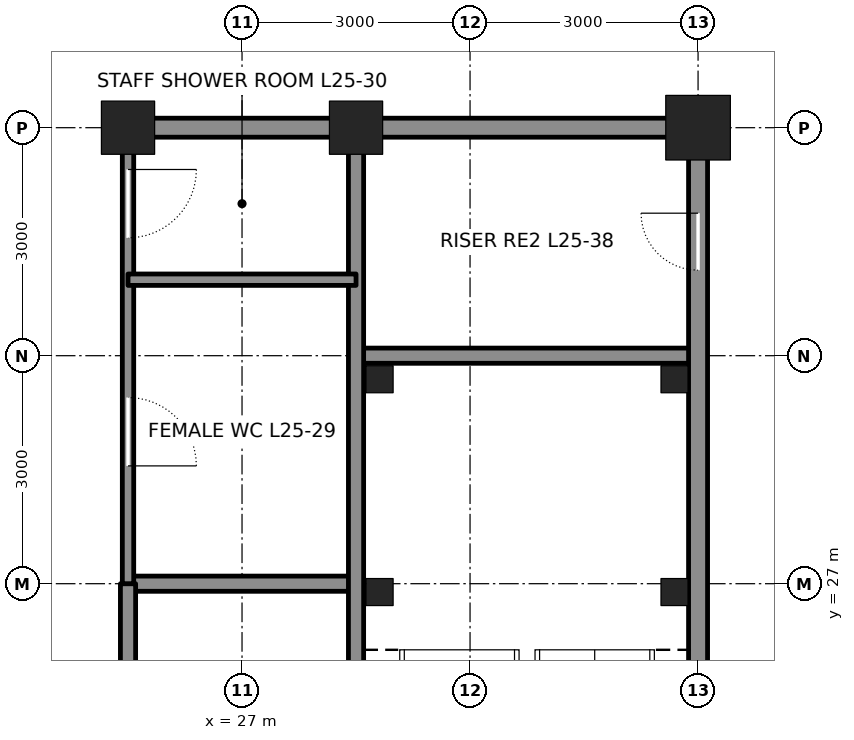
"""IFC4 building model, lengths in metres.
Left out: names, types, materials, properties, quantities, classifications, styles, units other than length and angle.
Written with IfcOpenShell. Run it as: python <this file> out.ifc"""

import sys

from ifc_helpers import new_model, si_unit, direction, frame, frame_2d, origin, origin_2d, place, context, subcontext, project, spatial, rectangle, hollow_rectangle, extrude, element, fill, save


model = new_model("IFC4")
c1 = context("Model", 3, precision=1e-05, world=origin(), true_north=direction((0.0, 1.0)))
c2 = subcontext(c1, "Body", "Model", "MODEL_VIEW")
j1 = project(units=[si_unit("LENGTHUNIT", "METRE"), si_unit("PLANEANGLEUNIT", "RADIAN")], contexts=[c1])
p1 = place(None, origin())
s1 = spatial("IfcSite", under=j1, at=p1, CompositionType="ELEMENT")
p2 = place(p1, origin())
s2 = spatial("IfcBuilding", under=s1, at=p2, CompositionType="ELEMENT")
p3 = place(p2, frame((0.0, 0.0, 119.4)))
s3 = spatial("IfcBuildingStorey", under=s2, at=p3, CompositionType="ELEMENT", Elevation=119.4)
for number, where, z_axis, x_axis in (
    (1, (25.5, 33.0, 0.0), (0.0, 0.0, 1.0), (1.0, 0.0, 0.0)),
    (2, (28.5, 33.0, 0.0), (0.0, 0.0, 1.0), (1.0, 0.0, 0.0)),
):
    element("IfcColumn", number, at=place(p3, frame(where, z_axis=z_axis, x_axis=x_axis)), inside=s3, PredefinedType="COLUMN", context=c2, shape_type="SweptSolid", body=[
        extrude(hollow_rectangle(XDim=0.7, YDim=0.7, WallThickness=0.07, at=origin_2d()), origin(), (0.0, 0.0, 1.0), 4.2),
    ])
p4 = place(p3, frame((33.0, 33.0, 0.0), z_axis=(0.0, 0.0, 1.0), x_axis=(1.0, 0.0, 0.0)))
e3 = element("IfcColumn", 3, at=p4, inside=s3, PredefinedType="COLUMN", context=c2, shape_type="SweptSolid", body=[
    extrude(hollow_rectangle(XDim=0.85, YDim=0.85, WallThickness=0.085, at=origin_2d()), origin(), (0.0, 0.0, 1.0), 4.2),
])
p5 = place(p3, frame((25.5, 27.0, 0.0), z_axis=(0.0, 0.0, 1.0), x_axis=(1.0, 0.0, 0.0)))
e4 = element("IfcWall", 4, at=p5, inside=s3, PredefinedType="SOLIDWALL", context=c2, shape_type="SweptSolid", body=[
    extrude(rectangle(XDim=3.0, YDim=0.2, at=frame_2d((1.5, 0.0))), origin(), (0.0, 0.0, 1.0), 4.04),
])
p6 = place(p3, frame((28.5, 30.0, 0.0), z_axis=(0.0, 0.0, 1.0), x_axis=(1.0, 0.0, 0.0)))
e5 = element("IfcWall", 5, at=p6, inside=s3, PredefinedType="SOLIDWALL", context=c2, shape_type="SweptSolid", body=[
    extrude(rectangle(XDim=4.5, YDim=0.2, at=frame_2d((2.25, 0.0))), origin(), (0.0, 0.0, 1.0), 4.04),
])
p7 = place(p3, frame((25.75, 33.0, 0.0), z_axis=(0.0, 0.0, 1.0), x_axis=(1.0, 0.0, 0.0)))
e6 = element("IfcWall", 6, at=p7, inside=s3, PredefinedType="SOLIDWALL", context=c2, shape_type="SweptSolid", body=[
    extrude(rectangle(XDim=2.5, YDim=0.25, at=frame_2d((1.25, 0.0))), origin(), (0.0, 0.0, 1.0), 3.182),
])
p8 = place(p3, frame((28.75, 33.0, 0.0), z_axis=(0.0, 0.0, 1.0), x_axis=(1.0, 0.0, 0.0)))
e7 = element("IfcWall", 7, at=p8, inside=s3, PredefinedType="SOLIDWALL", context=c2, shape_type="SweptSolid", body=[
    extrude(rectangle(XDim=4.0, YDim=0.25, at=frame_2d((2.0, 0.0))), origin(), (0.0, 0.0, 1.0), 3.182),
])
p9 = place(p3, frame((25.5, 15.0, 0.0), z_axis=(0.0, 0.0, 1.0), x_axis=(0.0, 1.0, 0.0)))
e8 = element("IfcWall", 8, at=p9, inside=s3, PredefinedType="SOLIDWALL", context=c2, shape_type="SweptSolid", body=[
    extrude(rectangle(XDim=12.0, YDim=0.2, at=frame_2d((6.0, 0.0))), origin(), (0.0, 0.0, 1.0), 3.065),
])
p10 = place(p3, frame((25.5, 27.0, 0.0), z_axis=(0.0, 0.0, 1.0), x_axis=(0.0, 1.0, 0.0)))
e9 = element("IfcWall", 9, at=p10, inside=s3, PredefinedType="PARTITIONING", context=c2, shape_type="SweptSolid", body=[
    extrude(rectangle(XDim=5.75, YDim=0.15, at=frame_2d((2.875, 0.0))), origin(), (0.0, 0.0, 1.0), 3.065),
])
p11 = place(p10, frame((1.55, 0.0, 0.0)))
e10 = element("IfcOpeningElement", 10, at=p11, cuts=e9, PredefinedType="OPENING", context=c2, shape_type="SweptSolid", body=[
    extrude(rectangle(XDim=0.9, YDim=2.1, at=frame_2d((0.45, 1.05))), frame((0.0, 0.085, 0.0), z_axis=(0.0, -1.0, 0.0), x_axis=(1.0, 0.0, 0.0)), (0.0, 0.0, 1.0), 0.17),
])
p12 = place(p10, frame((4.55, 0.0, 0.0)))
e11 = element("IfcOpeningElement", 11, at=p12, cuts=e9, PredefinedType="OPENING", context=c2, shape_type="SweptSolid", body=[
    extrude(rectangle(XDim=0.9, YDim=2.1, at=frame_2d((0.45, 1.05))), frame((0.0, 0.085, 0.0), z_axis=(0.0, -1.0, 0.0), x_axis=(1.0, 0.0, 0.0)), (0.0, 0.0, 1.0), 0.17),
])
p13 = place(p3, frame((28.5, 24.25, 0.0), z_axis=(0.0, 0.0, 1.0), x_axis=(0.0, 1.0, 0.0)))
e12 = element("IfcWall", 12, at=p13, inside=s3, PredefinedType="SOLIDWALL", context=c2, shape_type="SweptSolid", body=[
    extrude(rectangle(XDim=8.5, YDim=0.2, at=frame_2d((4.25, 0.0))), origin(), (0.0, 0.0, 1.0), 3.113),
])
p14 = place(p3, frame((33.0, 24.25, 0.0), z_axis=(0.0, 0.0, 1.0), x_axis=(0.0, 1.0, 0.0)))
e13 = element("IfcWall", 13, at=p14, inside=s3, PredefinedType="SOLIDWALL", context=c2, shape_type="SweptSolid", body=[
    extrude(rectangle(XDim=8.5, YDim=0.25, at=frame_2d((4.25, 0.0))), origin(), (0.0, 0.0, 1.0), 3.113),
])
p15 = place(p14, frame((6.875, 0.0, 0.0)))
e14 = element("IfcOpeningElement", 14, at=p15, cuts=e13, PredefinedType="OPENING", context=c2, shape_type="SweptSolid", body=[
    extrude(rectangle(XDim=0.75, YDim=2.1, at=frame_2d((0.375, 1.05))), frame((0.0, 0.135, 0.0), z_axis=(0.0, -1.0, 0.0), x_axis=(1.0, 0.0, 0.0)), (0.0, 0.0, 1.0), 0.27),
])
p16 = place(p3, frame((25.5, 31.0, 0.0), z_axis=(0.0, 0.0, 1.0), x_axis=(1.0, 0.0, 0.0)))
e15 = element("IfcWall", 15, at=p16, inside=s3, PredefinedType="PARTITIONING", context=c2, shape_type="SweptSolid", body=[
    extrude(rectangle(XDim=3.0, YDim=0.15, at=frame_2d((1.5, 0.0))), origin(), (0.0, 0.0, 1.0), 4.04),
])
for number, where, z_axis, x_axis in (
    (16, (28.81, 29.69, 0.0), (0.0, 0.0, 1.0), (1.0, 0.0, 0.0)),
    (17, (32.69, 29.69, 0.0), (0.0, 0.0, 1.0), (1.0, 0.0, 0.0)),
    (18, (28.81, 26.89, 0.0), (0.0, 0.0, 1.0), (1.0, 0.0, 0.0)),
    (19, (32.69, 26.89, 0.0), (0.0, 0.0, 1.0), (1.0, 0.0, 0.0)),
):
    element("IfcColumn", number, at=place(p3, frame(where, z_axis=z_axis, x_axis=x_axis)), inside=s3, PredefinedType="COLUMN", context=c2, shape_type="SweptSolid", body=[
        extrude(hollow_rectangle(XDim=0.356, YDim=0.356, WallThickness=0.015, at=origin_2d()), origin(), (0.0, 0.0, 1.0), 4.2),
    ])
p17 = place(p15, origin())
e20 = element("IfcDoor", 20, at=p17, inside=s3, OperationType="SINGLE_SWING_RIGHT", PredefinedType="DOOR", context=c2, shape_type="SweptSolid", body=[
    extrude(rectangle(XDim=0.75, YDim=2.1, at=frame_2d((0.375, 1.05))), frame((0.0, 0.025, 0.0), z_axis=(0.0, -1.0, 0.0), x_axis=(1.0, 0.0, 0.0)), (0.0, 0.0, 1.0), 0.05),
])
fill(e14, e20)
p18 = place(p11, frame((0.9, 0.0, 0.0), z_axis=(0.0, 0.0, 1.0), x_axis=(-1.0, 0.0, 0.0)))
e21 = element("IfcDoor", 21, at=p18, inside=s3, OperationType="SINGLE_SWING_RIGHT", PredefinedType="DOOR", context=c2, shape_type="SweptSolid", body=[
    extrude(rectangle(XDim=0.9, YDim=2.1, at=frame_2d((0.45, 1.05))), frame((0.0, 0.025, 0.0), z_axis=(0.0, -1.0, 0.0), x_axis=(1.0, 0.0, 0.0)), (0.0, 0.0, 1.0), 0.05),
])
fill(e10, e21)
p19 = place(p12, frame((0.9, 0.0, 0.0), z_axis=(0.0, 0.0, 1.0), x_axis=(-1.0, 0.0, 0.0)))
e22 = element("IfcDoor", 22, at=p19, inside=s3, OperationType="SINGLE_SWING_LEFT", PredefinedType="DOOR", context=c2, shape_type="SweptSolid", body=[
    extrude(rectangle(XDim=0.9, YDim=2.1, at=frame_2d((0.45, 1.05))), frame((0.0, 0.025, 0.0), z_axis=(0.0, -1.0, 0.0), x_axis=(1.0, 0.0, 0.0)), (0.0, 0.0, 1.0), 0.05),
])
fill(e11, e22)
save(model, sys.argv[1])
